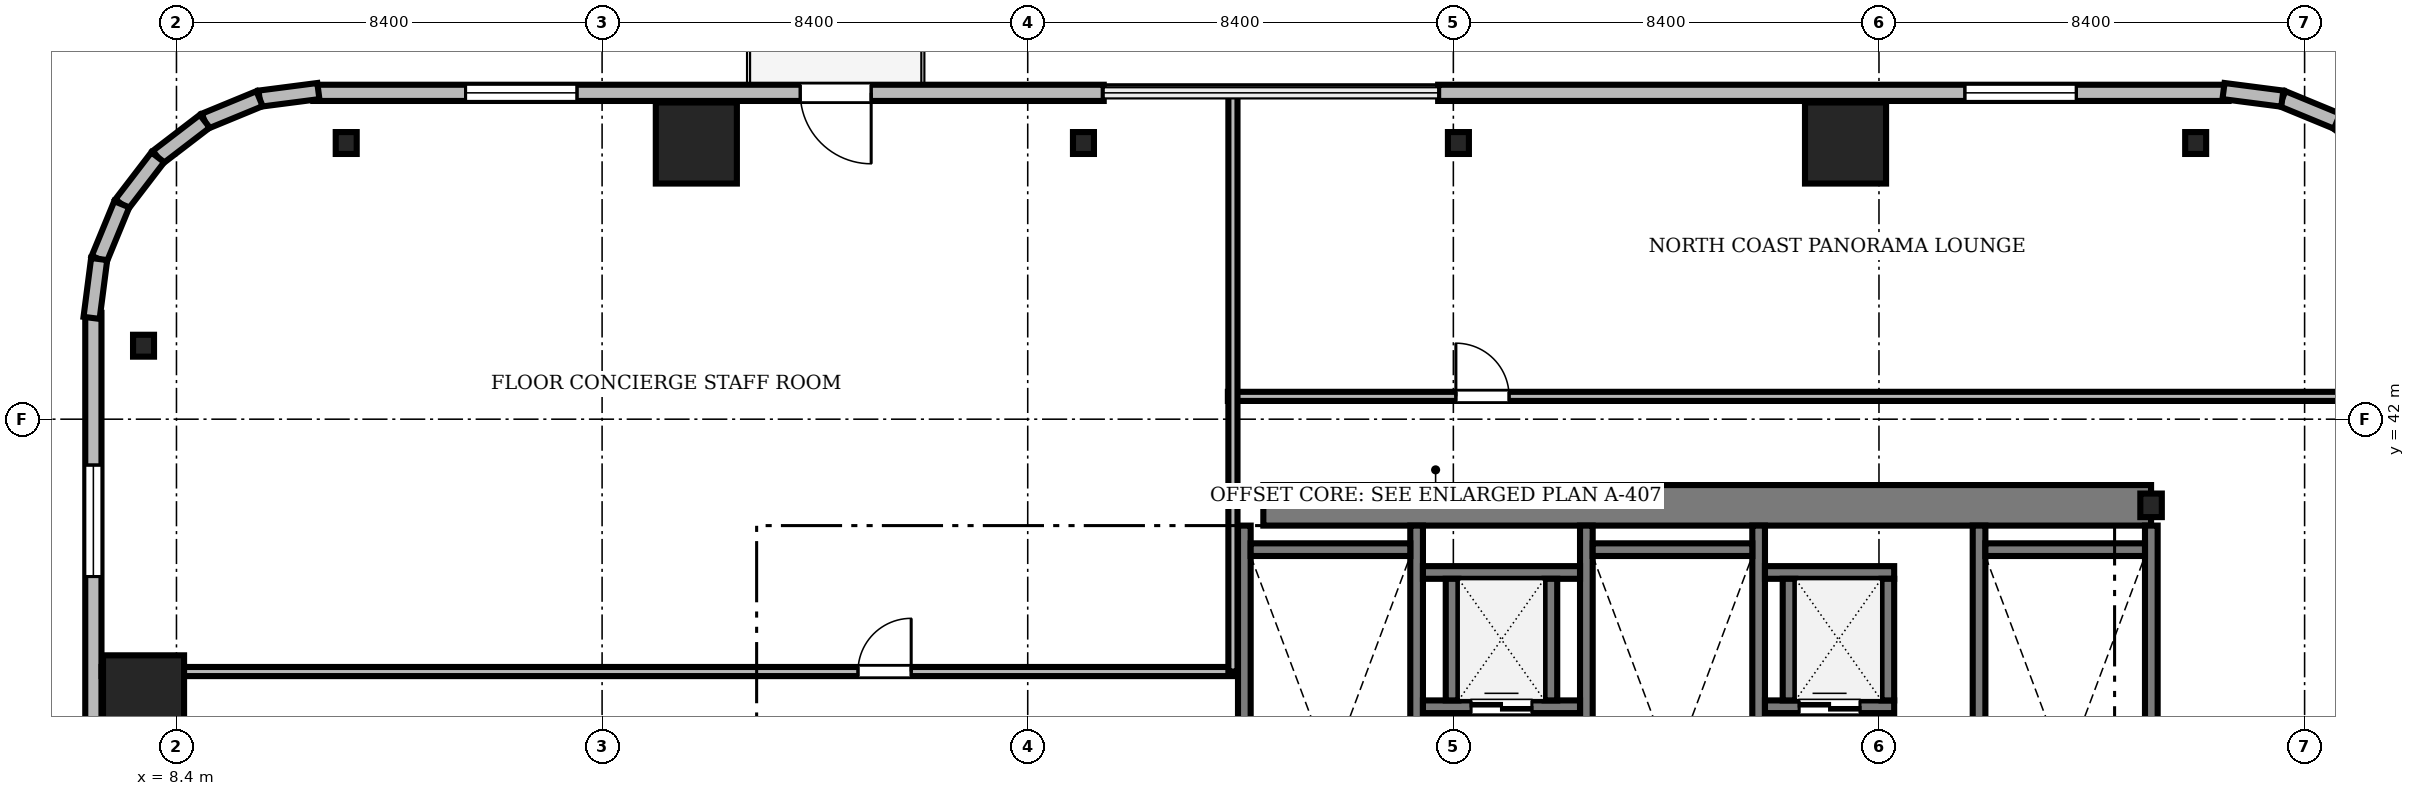
"""IFC4 building model, lengths in metres.
Left out: names, types, materials, properties, quantities, classifications, styles, units other than length and angle.
Written with IfcOpenShell. Run it as: python <this file> out.ifc"""

import sys

from ifc_helpers import new_model, si_unit, direction, frame, frame_2d, origin, origin_2d, place, context, subcontext, project, spatial, rectangle, i_section, extrude, source, transform, mapped, element, fill, save


model = new_model("IFC4")
c1 = context("Model", 3, precision=1e-05, world=origin(), true_north=direction((0.0, 1.0)))
c2 = subcontext(c1, "Body", "Model", "MODEL_VIEW")
j1 = project(units=[si_unit("LENGTHUNIT", "METRE"), si_unit("PLANEANGLEUNIT", "RADIAN")], contexts=[c1])
p1 = place(None, origin())
s1 = spatial("IfcSite", under=j1, at=p1, CompositionType="ELEMENT")
p2 = place(p1, origin())
s2 = spatial("IfcBuilding", under=s1, at=p2, CompositionType="ELEMENT")
p3 = place(p2, frame((0.0, 0.0, 129.8)))
s3 = spatial("IfcBuildingStorey", under=s2, at=p3, CompositionType="ELEMENT", Elevation=129.8)
m1 = source(origin(), c2, "Body", "SweptSolid", [
    extrude(rectangle(XDim=17.52, YDim=0.8, at=frame_2d((8.76, 0.0))), origin(), (0.0, 0.0, 1.0), 3.46),
])
p4 = place(p3, frame((29.85, 40.3, 0.0), z_axis=(0.0, 0.0, 1.0), x_axis=(1.0, 0.0, 0.0)))
e1 = element("IfcWall", 1, at=p4, inside=s3, PredefinedType="SHEAR", context=c2, shape_type="MappedRepresentation", body=[
    mapped(m1, transform((0.0, 0.0, 0.0), scale=1.0)),
])
m2 = source(origin(), c2, "Body", "SweptSolid", [
    extrude(i_section(OverallWidth=0.424, OverallDepth=0.465, WebThickness=0.035, FlangeThickness=0.056, FilletRadius=0.015, at=origin_2d()), origin(), (0.0, 0.0, 1.0), 3.46),
])
p5 = place(p3, frame((47.37, 40.3, 0.0), z_axis=(0.0, 0.0, 1.0), x_axis=(1.0, 0.0, 0.0)))
e2 = element("IfcColumn", 2, at=p5, inside=s3, PredefinedType="COLUMN", context=c2, shape_type="MappedRepresentation", body=[
    mapped(m2, transform((0.0, 0.0, 0.0), scale=1.0)),
])
m3 = source(origin(), c2, "Body", "SweptSolid", [
    extrude(rectangle(XDim=1.6, YDim=1.6, at=origin_2d()), origin(), (0.0, 0.0, 1.0), 3.46),
])
for number, where, z_axis, x_axis in (
    (3, (41.34, 47.45, 0.0), (0.0, 0.0, 1.0), (1.0, 0.0, 0.0)),
    (4, (18.66, 47.45, 0.0), (0.0, 0.0, 1.0), (1.0, 0.0, 0.0)),
    (5, (7.75, 36.54, 0.0), (0.0, 0.0, 1.0), (1.0, 0.0, 0.0)),
):
    element("IfcColumn", number, at=place(p3, frame(where, z_axis=z_axis, x_axis=x_axis)), inside=s3, PredefinedType="COLUMN", context=c2, shape_type="MappedRepresentation", body=[
        mapped(m3, transform((0.0, 0.0, 0.0), scale=1.0)),
    ])
m4 = source(origin(), c2, "Body", "SweptSolid", [
    extrude(i_section(OverallWidth=0.414, OverallDepth=0.432, WebThickness=0.026, FlangeThickness=0.04, FilletRadius=0.015, at=origin_2d()), origin(), (0.0, 0.0, 1.0), 3.46),
])
for number, where, z_axis, x_axis in (
    (6, (48.25, 47.45, 0.0), (0.0, 0.0, 1.0), (1.0, 0.0, 0.0)),
    (7, (33.7, 47.45, 0.0), (0.0, 0.0, 1.0), (1.0, 0.0, 0.0)),
    (8, (26.3, 47.45, 0.0), (0.0, 0.0, 1.0), (1.0, 0.0, 0.0)),
    (9, (11.75, 47.45, 0.0), (0.0, 0.0, 1.0), (1.0, 0.0, 0.0)),
    (10, (7.75, 43.45, 0.0), (0.0, 0.0, 1.0), (1.0, 0.0, 0.0)),
):
    element("IfcColumn", number, at=place(p3, frame(where, z_axis=z_axis, x_axis=x_axis)), inside=s3, PredefinedType="COLUMN", context=c2, shape_type="MappedRepresentation", body=[
        mapped(m4, transform((0.0, 0.0, 0.0), scale=1.0)),
    ])
m5 = source(origin(), c2, "Body", "SweptSolid", [
    extrude(rectangle(XDim=15.6, YDim=0.32, at=frame_2d((7.8, 0.0))), origin(), (0.0, 0.0, 1.0), 3.46),
])
p6 = place(p3, frame((48.9, 48.44, 0.0), z_axis=(0.0, 0.0, 1.0), x_axis=(-1.0, 0.0, 0.0)))
e11 = element("IfcWall", 11, at=p6, inside=s3, PredefinedType="SOLIDWALL", context=c2, shape_type="MappedRepresentation", body=[
    mapped(m5, transform((0.0, 0.0, 0.0), scale=1.0)),
])
m6 = source(origin(), c2, "Body", "SweptSolid", [
    extrude(rectangle(XDim=2.2, YDim=2.4, at=frame_2d((1.1, 1.2))), frame((0.0, 0.17, 0.0), z_axis=(0.0, -1.0, 0.0), x_axis=(1.0, 0.0, 0.0)), (0.0, 0.0, 1.0), 0.34),
])
p7 = place(p6, frame((3.005, 0.0, 0.72)))
e12 = element("IfcOpeningElement", 12, at=p7, cuts=e11, PredefinedType="OPENING", context=c2, shape_type="MappedRepresentation", body=[
    mapped(m6, transform((0.0, 0.0, 0.0), scale=1.0)),
])
p8 = place(p3, frame((26.7, 48.44, 0.0), z_axis=(0.0, 0.0, 1.0), x_axis=(-1.0, 0.0, 0.0)))
e13 = element("IfcWall", 13, at=p8, inside=s3, PredefinedType="SOLIDWALL", context=c2, shape_type="MappedRepresentation", body=[
    mapped(m5, transform((0.0, 0.0, 0.0), scale=1.0)),
])
m7 = source(origin(), c2, "Body", "SweptSolid", [
    extrude(rectangle(XDim=1.4, YDim=2.3, at=frame_2d((0.7, 1.15))), frame((0.0, 0.17, 0.0), z_axis=(0.0, -1.0, 0.0), x_axis=(1.0, 0.0, 0.0)), (0.0, 0.0, 1.0), 0.34),
])
p9 = place(p8, frame((4.59, 0.0, 0.0)))
e14 = element("IfcOpeningElement", 14, at=p9, cuts=e13, PredefinedType="OPENING", context=c2, shape_type="MappedRepresentation", body=[
    mapped(m7, transform((0.0, 0.0, 0.0), scale=1.0)),
])
p10 = place(p8, frame((10.395, 0.0, 0.72)))
e15 = element("IfcOpeningElement", 15, at=p10, cuts=e13, PredefinedType="OPENING", context=c2, shape_type="MappedRepresentation", body=[
    mapped(m6, transform((0.0, 0.0, 0.0), scale=1.0)),
])
m8 = source(origin(), c2, "Body", "SweptSolid", [
    extrude(rectangle(XDim=15.6, YDim=0.32, at=frame_2d((7.8, 0.0))), origin(), (0.0, 0.0, 1.0), 3.46),
])
p11 = place(p3, frame((6.76, 44.1, 0.0), z_axis=(0.0, 0.0, 1.0), x_axis=(0.0, -1.0, 0.0)))
e16 = element("IfcWall", 16, at=p11, inside=s3, PredefinedType="SOLIDWALL", context=c2, shape_type="MappedRepresentation", body=[
    mapped(m8, transform((0.0, 0.0, 0.0), scale=1.0)),
])
p12 = place(p11, frame((3.005, 0.0, 0.72)))
e17 = element("IfcOpeningElement", 17, at=p12, cuts=e16, PredefinedType="OPENING", context=c2, shape_type="MappedRepresentation", body=[
    mapped(m6, transform((0.0, 0.0, 0.0), scale=1.0)),
])
m9 = source(origin(), c2, "Body", "SweptSolid", [
    extrude(rectangle(XDim=1.169, YDim=0.32, at=frame_2d((0.584, 0.0))), origin(), (0.0, 0.0, 1.0), 3.46),
])
p13 = place(p3, frame((51.969, 47.169, 0.0), z_axis=(0.0, 0.0, 1.0), x_axis=(-0.793663520347, 0.608356981114, 0.0)))
e18 = element("IfcWall", 18, at=p13, inside=s3, PredefinedType="SOLIDWALL", context=c2, shape_type="MappedRepresentation", body=[
    mapped(m9, transform((0.0, 0.0, 0.0), scale=1.0)),
])
m10 = source(origin(), c2, "Body", "SweptSolid", [
    extrude(rectangle(XDim=1.169, YDim=0.32, at=frame_2d((0.584, 0.0))), origin(), (0.0, 0.0, 1.0), 3.46),
])
p14 = place(p3, frame((51.041, 47.88, 0.0), z_axis=(0.0, 0.0, 1.0), x_axis=(-0.924552646638, 0.381054331552, 0.0)))
e19 = element("IfcWall", 19, at=p14, inside=s3, PredefinedType="SOLIDWALL", context=c2, shape_type="MappedRepresentation", body=[
    mapped(m10, transform((0.0, 0.0, 0.0), scale=1.0)),
])
m11 = source(origin(), c2, "Body", "SweptSolid", [
    extrude(rectangle(XDim=1.17, YDim=0.32, at=frame_2d((0.585, 0.0))), origin(), (0.0, 0.0, 1.0), 3.46),
])
for number, where, z_axis, x_axis in (
    (20, (49.96, 48.325, 0.0), (0.0, 0.0, 1.0), (-0.992, 0.128, 0.0)),
    (21, (11.2, 48.476, 0.0), (0.0, 0.0, 1.0), (-0.992, -0.128, 0.0)),
):
    element("IfcWall", number, at=place(p3, frame(where, z_axis=z_axis, x_axis=x_axis)), inside=s3, PredefinedType="SOLIDWALL", context=c2, shape_type="MappedRepresentation", body=[
        mapped(m11, transform((0.0, 0.0, 0.0), scale=1.0)),
    ])
p15 = place(p3, frame((10.04, 48.325, 0.0), z_axis=(0.0, 0.0, 1.0), x_axis=(-0.924552646638, -0.381054331552, 0.0)))
e22 = element("IfcWall", 22, at=p15, inside=s3, PredefinedType="SOLIDWALL", context=c2, shape_type="MappedRepresentation", body=[
    mapped(m10, transform((0.0, 0.0, 0.0), scale=1.0)),
])
p16 = place(p3, frame((8.959, 47.88, 0.0), z_axis=(0.0, 0.0, 1.0), x_axis=(-0.793663520347, -0.608356981114, 0.0)))
e23 = element("IfcWall", 23, at=p16, inside=s3, PredefinedType="SOLIDWALL", context=c2, shape_type="MappedRepresentation", body=[
    mapped(m9, transform((0.0, 0.0, 0.0), scale=1.0)),
])
m12 = source(origin(), c2, "Body", "SweptSolid", [
    extrude(rectangle(XDim=1.169, YDim=0.32, at=frame_2d((0.584, 0.0))), origin(), (0.0, 0.0, 1.0), 3.46),
])
p17 = place(p3, frame((8.031, 47.169, 0.0), z_axis=(0.0, 0.0, 1.0), x_axis=(-0.608387696831, -0.793639975269, 0.0)))
e24 = element("IfcWall", 24, at=p17, inside=s3, PredefinedType="SOLIDWALL", context=c2, shape_type="MappedRepresentation", body=[
    mapped(m12, transform((0.0, 0.0, 0.0), scale=1.0)),
])
p18 = place(p3, frame((7.32, 46.241, 0.0), z_axis=(0.0, 0.0, 1.0), x_axis=(-0.381054331552, -0.924552646638, 0.0)))
e25 = element("IfcWall", 25, at=p18, inside=s3, PredefinedType="SOLIDWALL", context=c2, shape_type="MappedRepresentation", body=[
    mapped(m10, transform((0.0, 0.0, 0.0), scale=1.0)),
])
p19 = place(p3, frame((6.875, 45.16, 0.0), z_axis=(0.0, 0.0, 1.0), x_axis=(-0.128295670475, -0.991735963317, 0.0)))
e26 = element("IfcWall", 26, at=p19, inside=s3, PredefinedType="SOLIDWALL", context=c2, shape_type="MappedRepresentation", body=[
    mapped(m11, transform((0.0, 0.0, 0.0), scale=1.0)),
])
m13 = source(origin(), c2, "Body", "SweptSolid", [
    extrude(rectangle(XDim=9.25, YDim=0.25, at=frame_2d((4.625, 0.0))), origin(), (0.0, 0.0, 1.0), 3.5),
])
for number, where, z_axis, x_axis in (
    (27, (29.475, 30.65, 0.0), (0.0, 0.0, 1.0), (0.0, 1.0, 0.0)),
    (28, (32.875, 30.65, 0.0), (0.0, 0.0, 1.0), (0.0, 1.0, 0.0)),
):
    element("IfcWall", number, at=place(p3, frame(where, z_axis=z_axis, x_axis=x_axis)), inside=s3, PredefinedType="SOLIDWALL", context=c2, shape_type="MappedRepresentation", body=[
        mapped(m13, transform((0.0, 0.0, 0.0), scale=1.0)),
    ])
m14 = source(origin(), c2, "Body", "SweptSolid", [
    extrude(rectangle(XDim=3.15, YDim=0.25, at=frame_2d((1.575, 0.0))), origin(), (0.0, 0.0, 1.0), 3.5),
])
p20 = place(p3, frame((29.6, 39.425, 0.0), z_axis=(0.0, 0.0, 1.0), x_axis=(1.0, 0.0, 0.0)))
e29 = element("IfcWall", 29, at=p20, inside=s3, PredefinedType="SOLIDWALL", context=c2, shape_type="MappedRepresentation", body=[
    mapped(m14, transform((0.0, 0.0, 0.0), scale=1.0)),
])
for number, where, z_axis, x_axis in (
    (30, (36.225, 30.65, 0.0), (0.0, 0.0, 1.0), (0.0, 1.0, 0.0)),
    (31, (39.625, 30.65, 0.0), (0.0, 0.0, 1.0), (0.0, 1.0, 0.0)),
):
    element("IfcWall", number, at=place(p3, frame(where, z_axis=z_axis, x_axis=x_axis)), inside=s3, PredefinedType="SOLIDWALL", context=c2, shape_type="MappedRepresentation", body=[
        mapped(m13, transform((0.0, 0.0, 0.0), scale=1.0)),
    ])
p21 = place(p3, frame((36.35, 39.425, 0.0), z_axis=(0.0, 0.0, 1.0), x_axis=(1.0, 0.0, 0.0)))
e32 = element("IfcWall", 32, at=p21, inside=s3, PredefinedType="SOLIDWALL", context=c2, shape_type="MappedRepresentation", body=[
    mapped(m14, transform((0.0, 0.0, 0.0), scale=1.0)),
])
for number, where, z_axis, x_axis in (
    (33, (43.975, 30.65, 0.0), (0.0, 0.0, 1.0), (0.0, 1.0, 0.0)),
    (34, (47.375, 30.65, 0.0), (0.0, 0.0, 1.0), (0.0, 1.0, 0.0)),
):
    element("IfcWall", number, at=place(p3, frame(where, z_axis=z_axis, x_axis=x_axis)), inside=s3, PredefinedType="SOLIDWALL", context=c2, shape_type="MappedRepresentation", body=[
        mapped(m13, transform((0.0, 0.0, 0.0), scale=1.0)),
    ])
p22 = place(p3, frame((44.1, 39.425, 0.0), z_axis=(0.0, 0.0, 1.0), x_axis=(1.0, 0.0, 0.0)))
e35 = element("IfcWall", 35, at=p22, inside=s3, PredefinedType="SOLIDWALL", context=c2, shape_type="MappedRepresentation", body=[
    mapped(m14, transform((0.0, 0.0, 0.0), scale=1.0)),
])
m15 = source(origin(), c2, "Body", "SweptSolid", [
    extrude(rectangle(XDim=3.1, YDim=0.25, at=frame_2d((1.55, 0.0))), origin(), (0.0, 0.0, 1.0), 3.46),
])
p23 = place(p3, frame((33.0, 36.325, 0.0), z_axis=(0.0, 0.0, 1.0), x_axis=(1.0, 0.0, 0.0)))
e36 = element("IfcWall", 36, at=p23, inside=s3, PredefinedType="SOLIDWALL", context=c2, shape_type="MappedRepresentation", body=[
    mapped(m15, transform((0.0, 0.0, 0.0), scale=1.0)),
])
m16 = source(origin(), c2, "Body", "SweptSolid", [
    extrude(rectangle(XDim=1.2, YDim=2.25, at=frame_2d((0.6, 1.125))), frame((0.0, 0.135, 0.0), z_axis=(0.0, -1.0, 0.0), x_axis=(1.0, 0.0, 0.0)), (0.0, 0.0, 1.0), 0.27),
])
p24 = place(p23, frame((0.95, 0.0, 0.0)))
e37 = element("IfcOpeningElement", 37, at=p24, cuts=e36, PredefinedType="OPENING", context=c2, shape_type="MappedRepresentation", body=[
    mapped(m16, transform((0.0, 0.0, 0.0), scale=1.0)),
])
p25 = place(p3, frame((33.0, 38.975, 0.0), z_axis=(0.0, 0.0, 1.0), x_axis=(1.0, 0.0, 0.0)))
e38 = element("IfcWall", 38, at=p25, inside=s3, PredefinedType="SOLIDWALL", context=c2, shape_type="MappedRepresentation", body=[
    mapped(m15, transform((0.0, 0.0, 0.0), scale=1.0)),
])
m17 = source(origin(), c2, "Body", "SweptSolid", [
    extrude(rectangle(XDim=2.4, YDim=0.25, at=frame_2d((1.2, 0.0))), origin(), (0.0, 0.0, 1.0), 3.46),
])
for number, where, z_axis, x_axis in (
    (39, (33.575, 36.45, 0.0), (0.0, 0.0, 1.0), (0.0, 1.0, 0.0)),
    (40, (35.525, 36.45, 0.0), (0.0, 0.0, 1.0), (0.0, 1.0, 0.0)),
):
    element("IfcWall", number, at=place(p3, frame(where, z_axis=z_axis, x_axis=x_axis)), inside=s3, PredefinedType="SOLIDWALL", context=c2, shape_type="MappedRepresentation", body=[
        mapped(m17, transform((0.0, 0.0, 0.0), scale=1.0)),
    ])
m18 = source(origin(), c2, "Body", "SweptSolid", [
    extrude(rectangle(XDim=2.55, YDim=0.25, at=frame_2d((1.275, 0.0))), origin(), (0.0, 0.0, 1.0), 3.46),
])
p26 = place(p3, frame((39.75, 36.325, 0.0), z_axis=(0.0, 0.0, 1.0), x_axis=(1.0, 0.0, 0.0)))
e41 = element("IfcWall", 41, at=p26, inside=s3, PredefinedType="SOLIDWALL", context=c2, shape_type="MappedRepresentation", body=[
    mapped(m18, transform((0.0, 0.0, 0.0), scale=1.0)),
])
p27 = place(p26, frame((0.675, 0.0, 0.0)))
e42 = element("IfcOpeningElement", 42, at=p27, cuts=e41, PredefinedType="OPENING", context=c2, shape_type="MappedRepresentation", body=[
    mapped(m16, transform((0.0, 0.0, 0.0), scale=1.0)),
])
p28 = place(p3, frame((39.75, 38.975, 0.0), z_axis=(0.0, 0.0, 1.0), x_axis=(1.0, 0.0, 0.0)))
e43 = element("IfcWall", 43, at=p28, inside=s3, PredefinedType="SOLIDWALL", context=c2, shape_type="MappedRepresentation", body=[
    mapped(m18, transform((0.0, 0.0, 0.0), scale=1.0)),
])
for number, where, z_axis, x_axis in (
    (44, (40.225, 36.45, 0.0), (0.0, 0.0, 1.0), (0.0, 1.0, 0.0)),
    (45, (42.175, 36.45, 0.0), (0.0, 0.0, 1.0), (0.0, 1.0, 0.0)),
):
    element("IfcWall", number, at=place(p3, frame(where, z_axis=z_axis, x_axis=x_axis)), inside=s3, PredefinedType="SOLIDWALL", context=c2, shape_type="MappedRepresentation", body=[
        mapped(m17, transform((0.0, 0.0, 0.0), scale=1.0)),
    ])
m19 = source(origin(), c2, "Body", "SweptSolid", [
    extrude(rectangle(XDim=23.928, YDim=0.18, at=frame_2d((11.964, 0.0))), origin(), (0.0, 0.0, 1.0), 2.702),
])
p29 = place(p3, frame((29.15, 42.45, 0.0), z_axis=(0.0, 0.0, 1.0), x_axis=(1.0, 0.0, 0.0)))
e46 = element("IfcWall", 46, at=p29, inside=s3, PredefinedType="PARTITIONING", context=c2, shape_type="MappedRepresentation", body=[
    mapped(m19, transform((0.0, 0.0, 0.0), scale=1.0)),
])
m20 = source(origin(), c2, "Body", "SweptSolid", [
    extrude(rectangle(XDim=1.05, YDim=2.2, at=frame_2d((0.525, 1.1))), frame((0.0, 0.1, 0.0), z_axis=(0.0, -1.0, 0.0), x_axis=(1.0, 0.0, 0.0)), (0.0, 0.0, 1.0), 0.2),
])
p30 = place(p29, frame((4.5, 0.0, 0.0)))
e47 = element("IfcOpeningElement", 47, at=p30, cuts=e46, PredefinedType="OPENING", context=c2, shape_type="MappedRepresentation", body=[
    mapped(m20, transform((0.0, 0.0, 0.0), scale=1.0)),
])
m21 = source(origin(), c2, "Body", "SweptSolid", [
    extrude(rectangle(XDim=22.328, YDim=0.18, at=frame_2d((11.164, 0.0))), origin(), (0.0, 0.0, 1.0), 2.702),
])
p31 = place(p3, frame((6.922, 37.02, 0.0), z_axis=(0.0, 0.0, 1.0), x_axis=(1.0, 0.0, 0.0)))
e48 = element("IfcWall", 48, at=p31, inside=s3, PredefinedType="PARTITIONING", context=c2, shape_type="MappedRepresentation", body=[
    mapped(m21, transform((0.0, 0.0, 0.0), scale=1.0)),
])
p32 = place(p31, frame((14.928, 0.0, 0.0)))
e49 = element("IfcOpeningElement", 49, at=p32, cuts=e48, PredefinedType="OPENING", context=c2, shape_type="MappedRepresentation", body=[
    mapped(m20, transform((0.0, 0.0, 0.0), scale=1.0)),
])
m22 = source(origin(), c2, "Body", "SweptSolid", [
    extrude(rectangle(XDim=11.45, YDim=0.18, at=frame_2d((5.725, 0.0))), origin(), (0.0, 0.0, 1.0), 2.702),
])
p33 = place(p3, frame((29.25, 37.02, 0.0), z_axis=(0.0, 0.0, 1.0), x_axis=(0.0, 1.0, 0.0)))
e50 = element("IfcWall", 50, at=p33, inside=s3, PredefinedType="PARTITIONING", context=c2, shape_type="MappedRepresentation", body=[
    mapped(m22, transform((0.0, 0.0, 0.0), scale=1.0)),
])
m23 = source(origin(), c2, "Body", "SweptSolid", [
    extrude(rectangle(XDim=1.4, YDim=2.3, at=frame_2d((0.7, 1.15))), frame((0.0, 0.025, 0.0), z_axis=(0.0, -1.0, 0.0), x_axis=(1.0, 0.0, 0.0)), (0.0, 0.0, 1.0), 0.05),
])
p34 = place(p9, frame((1.4, 0.0, 0.0), z_axis=(0.0, 0.0, 1.0), x_axis=(-1.0, 0.0, 0.0)))
e51 = element("IfcDoor", 51, at=p34, inside=s3, OperationType="DOUBLE_DOOR_SLIDING", PredefinedType="DOOR", context=c2, shape_type="MappedRepresentation", body=[
    mapped(m23, transform((0.0, 0.0, 0.0), scale=1.0)),
])
fill(e14, e51)
m24 = source(origin(), c2, "Body", "SweptSolid", [
    extrude(rectangle(XDim=2.2, YDim=2.4, at=frame_2d((1.1, 1.2))), frame((0.0, 0.03, 0.0), z_axis=(0.0, -1.0, 0.0), x_axis=(1.0, 0.0, 0.0)), (0.0, 0.0, 1.0), 0.06),
])
p35 = place(p7, origin())
e52 = element("IfcWindow", 52, at=p35, inside=s3, PartitioningType="SINGLE_PANEL", PredefinedType="WINDOW", context=c2, shape_type="MappedRepresentation", body=[
    mapped(m24, transform((0.0, 0.0, 0.0), scale=1.0)),
])
fill(e12, e52)
p36 = place(p10, origin())
e53 = element("IfcWindow", 53, at=p36, inside=s3, PartitioningType="SINGLE_PANEL", PredefinedType="WINDOW", context=c2, shape_type="MappedRepresentation", body=[
    mapped(m24, transform((0.0, 0.0, 0.0), scale=1.0)),
])
fill(e15, e53)
p37 = place(p12, origin())
e54 = element("IfcWindow", 54, at=p37, inside=s3, PartitioningType="SINGLE_PANEL", PredefinedType="WINDOW", context=c2, shape_type="MappedRepresentation", body=[
    mapped(m24, transform((0.0, 0.0, 0.0), scale=1.0)),
])
fill(e17, e54)
m25 = source(origin(), c2, "Body", "SweptSolid", [
    extrude(rectangle(XDim=1.2, YDim=2.25, at=frame_2d((0.6, 1.125))), frame((0.0, 0.025, 0.0), z_axis=(0.0, -1.0, 0.0), x_axis=(1.0, 0.0, 0.0)), (0.0, 0.0, 1.0), 0.05),
])
p38 = place(p24, origin())
e55 = element("IfcDoor", 55, at=p38, inside=s3, OperationType="DOUBLE_DOOR_SLIDING", PredefinedType="DOOR", context=c2, shape_type="MappedRepresentation", body=[
    mapped(m25, transform((0.0, 0.0, 0.0), scale=1.0)),
])
fill(e37, e55)
p39 = place(p27, origin())
e56 = element("IfcDoor", 56, at=p39, inside=s3, OperationType="DOUBLE_DOOR_SLIDING", PredefinedType="DOOR", context=c2, shape_type="MappedRepresentation", body=[
    mapped(m25, transform((0.0, 0.0, 0.0), scale=1.0)),
])
fill(e42, e56)
m26 = source(origin(), c2, "Body", "SweptSolid", [
    extrude(rectangle(XDim=1.05, YDim=2.2, at=frame_2d((0.525, 1.1))), frame((0.0, 0.025, 0.0), z_axis=(0.0, -1.0, 0.0), x_axis=(1.0, 0.0, 0.0)), (0.0, 0.0, 1.0), 0.05),
])
p40 = place(p30, origin())
e57 = element("IfcDoor", 57, at=p40, inside=s3, OperationType="SINGLE_SWING_LEFT", PredefinedType="DOOR", context=c2, shape_type="MappedRepresentation", body=[
    mapped(m26, transform((0.0, 0.0, 0.0), scale=1.0)),
])
fill(e47, e57)
p41 = place(p32, origin())
e58 = element("IfcDoor", 58, at=p41, inside=s3, OperationType="SINGLE_SWING_RIGHT", PredefinedType="DOOR", context=c2, shape_type="MappedRepresentation", body=[
    mapped(m26, transform((0.0, 0.0, 0.0), scale=1.0)),
])
fill(e49, e58)
save(model, sys.argv[1])
